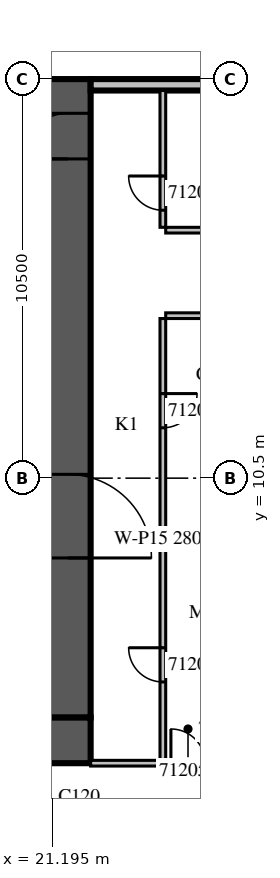
"""IFC4 building model, lengths in metres.
Left out: names, types, materials, properties, quantities, classifications, styles, units other than length and angle.
Written with IfcOpenShell. Run it as: python <this file> out.ifc"""

import sys

from ifc_helpers import new_model, si_unit, direction, frame, frame_2d, origin, place, context, subcontext, project, spatial, rectangle, extrude, source, transform, mapped, element, fill, save


model = new_model("IFC4")
c1 = context("Model", 3, precision=1e-05, world=origin(), true_north=direction((0.0, 1.0)))
c2 = subcontext(c1, "Body", "Model", "MODEL_VIEW")
j1 = project(units=[si_unit("LENGTHUNIT", "METRE"), si_unit("PLANEANGLEUNIT", "RADIAN")], contexts=[c1])
p1 = place(None, origin())
s1 = spatial("IfcSite", under=j1, at=p1, CompositionType="ELEMENT")
p2 = place(p1, origin())
s2 = spatial("IfcBuilding", under=s1, at=p2, CompositionType="ELEMENT")
p3 = place(p2, frame((0.0, 0.0, 61.5)))
s3 = spatial("IfcBuildingStorey", under=s2, at=p3, CompositionType="ELEMENT", Elevation=61.5)
m1 = source(origin(), c2, "Body", "SweptSolid", [
    extrude(rectangle(XDim=16.8, YDim=1.2, at=frame_2d((8.4, 0.0))), origin(), (0.0, 0.0, 1.0), 4.2),
])
p4 = place(p3, frame((21.6, 4.2, 0.0), z_axis=(0.0, 0.0, 1.0), x_axis=(0.0, 1.0, 0.0)))
e1 = element("IfcWall", 1, at=p4, inside=s3, PredefinedType="SHEAR", context=c2, shape_type="MappedRepresentation", body=[
    mapped(m1, transform((0.0, 0.0, 0.0), scale=1.0)),
])
m2 = source(origin(), c2, "Body", "SweptSolid", [
    extrude(rectangle(XDim=2.2, YDim=2.1, at=frame_2d((1.1, 1.05))), frame((0.0, 0.61, 0.0), z_axis=(0.0, -1.0, 0.0), x_axis=(1.0, 0.0, 0.0)), (0.0, 0.0, 1.0), 1.22),
])
p5 = place(p4, frame((4.2, 0.0, 0.0)))
e2 = element("IfcOpeningElement", 2, at=p5, cuts=e1, PredefinedType="OPENING", context=c2, shape_type="MappedRepresentation", body=[
    mapped(m2, transform((0.0, 0.0, 0.0), scale=1.0)),
])
m3 = source(origin(), c2, "Body", "SweptSolid", [
    extrude(rectangle(XDim=1.2, YDim=2.1, at=frame_2d((0.6, 1.05))), frame((0.0, 0.61, 0.0), z_axis=(0.0, -1.0, 0.0), x_axis=(1.0, 0.0, 0.0)), (0.0, 0.0, 1.0), 1.22),
])
p6 = place(p4, frame((14.7, 0.0, 0.0)))
e3 = element("IfcOpeningElement", 3, at=p6, cuts=e1, PredefinedType="OPENING", context=c2, shape_type="MappedRepresentation", body=[
    mapped(m3, transform((0.0, 0.0, 0.0), scale=1.0)),
])
m4 = source(origin(), c2, "Body", "SweptSolid", [
    extrude(rectangle(XDim=18.0, YDim=1.2, at=frame_2d((9.0, 0.0))), origin(), (0.0, 0.0, 1.0), 4.2),
])
p7 = place(p3, frame((4.2, 3.6, 0.0), z_axis=(0.0, 0.0, 1.0), x_axis=(1.0, 0.0, 0.0)))
e4 = element("IfcWall", 4, at=p7, inside=s3, PredefinedType="SHEAR", context=c2, shape_type="MappedRepresentation", body=[
    mapped(m4, transform((0.0, 0.0, 0.0), scale=1.0)),
])
m5 = source(origin(), c2, "Body", "SweptSolid", [
    extrude(rectangle(XDim=6.6, YDim=0.3, at=frame_2d((3.3, 0.0))), origin(), (0.0, 0.0, 1.0), 3.8),
])
p8 = place(p3, frame((28.8, 20.85, 0.0), z_axis=(0.0, 0.0, 1.0), x_axis=(-1.0, 0.0, 0.0)))
e5 = element("IfcWall", 5, at=p8, inside=s3, PredefinedType="STANDARD", context=c2, shape_type="MappedRepresentation", body=[
    mapped(m5, transform((0.0, 0.0, 0.0), scale=1.0)),
])
m6 = source(origin(), c2, "Body", "SweptSolid", [
    extrude(rectangle(XDim=2.4, YDim=2.7, at=frame_2d((1.2, 1.35))), frame((0.0, 0.16, 0.0), z_axis=(0.0, -1.0, 0.0), x_axis=(1.0, 0.0, 0.0)), (0.0, 0.0, 1.0), 0.32),
])
p9 = place(p8, frame((0.3, 0.0, 0.6)))
e6 = element("IfcOpeningElement", 6, at=p9, cuts=e5, PredefinedType="OPENING", context=c2, shape_type="MappedRepresentation", body=[
    mapped(m6, transform((0.0, 0.0, 0.0), scale=1.0)),
])
m7 = source(origin(), c2, "Body", "SweptSolid", [
    extrude(rectangle(XDim=11.625, YDim=0.15, at=frame_2d((5.812, 0.0))), origin(), (0.0, 0.0, 1.0), 2.8),
])
p10 = place(p3, frame((24.1, 14.7, 0.0), z_axis=(0.0, 0.0, 1.0), x_axis=(0.0, -1.0, 0.0)))
e7 = element("IfcWall", 7, at=p10, inside=s3, PredefinedType="PARTITIONING", context=c2, shape_type="MappedRepresentation", body=[
    mapped(m7, transform((0.0, 0.0, 0.0), scale=1.0)),
])
m8 = source(origin(), c2, "Body", "SweptSolid", [
    extrude(rectangle(XDim=0.9, YDim=2.1, at=frame_2d((0.45, 1.05))), frame((0.0, 0.085, 0.0), z_axis=(0.0, -1.0, 0.0), x_axis=(1.0, 0.0, 0.0)), (0.0, 0.0, 1.0), 0.17),
])
p11 = place(p10, frame((8.662, 0.0, 0.0)))
e8 = element("IfcOpeningElement", 8, at=p11, cuts=e7, PredefinedType="OPENING", context=c2, shape_type="MappedRepresentation", body=[
    mapped(m8, transform((0.0, 0.0, 0.0), scale=1.0)),
])
p12 = place(p10, frame((1.975, 0.0, 0.0)))
e9 = element("IfcOpeningElement", 9, at=p12, cuts=e7, PredefinedType="OPENING", context=c2, shape_type="MappedRepresentation", body=[
    mapped(m8, transform((0.0, 0.0, 0.0), scale=1.0)),
])
m9 = source(origin(), c2, "Body", "SweptSolid", [
    extrude(rectangle(XDim=3.6, YDim=0.15, at=frame_2d((1.8, 0.0))), origin(), (0.0, 0.0, 1.0), 3.8),
])
p13 = place(p3, frame((24.1, 20.7, 0.0), z_axis=(0.0, 0.0, 1.0), x_axis=(0.0, -1.0, 0.0)))
e10 = element("IfcWall", 10, at=p13, inside=s3, PredefinedType="PARTITIONING", context=c2, shape_type="MappedRepresentation", body=[
    mapped(m9, transform((0.0, 0.0, 0.0), scale=1.0)),
])
p14 = place(p13, frame((2.25, 0.0, 0.0)))
e11 = element("IfcOpeningElement", 11, at=p14, cuts=e10, PredefinedType="OPENING", context=c2, shape_type="MappedRepresentation", body=[
    mapped(m8, transform((0.0, 0.0, 0.0), scale=1.0)),
])
m10 = source(origin(), c2, "Body", "SweptSolid", [
    extrude(rectangle(XDim=5.15, YDim=0.15, at=frame_2d((2.575, 0.0))), origin(), (0.0, 0.0, 1.0), 3.3),
])
p15 = place(p3, frame((29.325, 8.7, 0.0), z_axis=(0.0, 0.0, 1.0), x_axis=(-1.0, 0.0, 0.0)))
e12 = element("IfcWall", 12, at=p15, inside=s3, PredefinedType="PARTITIONING", context=c2, shape_type="MappedRepresentation", body=[
    mapped(m10, transform((0.0, 0.0, 0.0), scale=1.0)),
])
m11 = source(origin(), c2, "Body", "SweptSolid", [
    extrude(rectangle(XDim=5.15, YDim=0.15, at=frame_2d((2.575, 0.0))), origin(), (0.0, 0.0, 1.0), 3.8),
])
for number, where, z_axis, x_axis in (
    (13, (29.325, 14.775, 0.0), (0.0, 0.0, 1.0), (-1.0, 0.0, 0.0)),
    (14, (24.175, 17.025, 0.0), (0.0, 0.0, 1.0), (1.0, 0.0, 0.0)),
):
    element("IfcWall", number, at=place(p3, frame(where, z_axis=z_axis, x_axis=x_axis)), inside=s3, PredefinedType="PARTITIONING", context=c2, shape_type="MappedRepresentation", body=[
        mapped(m11, transform((0.0, 0.0, 0.0), scale=1.0)),
    ])
m12 = source(origin(), c2, "Body", "SweptSolid", [
    extrude(rectangle(XDim=7.125, YDim=0.15, at=frame_2d((3.562, 0.0))), origin(), (0.0, 0.0, 1.0), 3.3),
])
p16 = place(p3, frame((22.2, 3.0, 0.0), z_axis=(0.0, 0.0, 1.0), x_axis=(1.0, 0.0, 0.0)))
e15 = element("IfcWall", 15, at=p16, inside=s3, PredefinedType="PARTITIONING", context=c2, shape_type="MappedRepresentation", body=[
    mapped(m12, transform((0.0, 0.0, 0.0), scale=1.0)),
])
m13 = source(origin(), c2, "Body", "SweptSolid", [
    extrude(rectangle(XDim=1.0, YDim=2.1, at=frame_2d((0.5, 1.05))), frame((0.0, 0.085, 0.0), z_axis=(0.0, -1.0, 0.0), x_axis=(1.0, 0.0, 0.0)), (0.0, 0.0, 1.0), 0.17),
])
p17 = place(p16, frame((3.1, 0.0, 0.0)))
e16 = element("IfcOpeningElement", 16, at=p17, cuts=e15, PredefinedType="OPENING", context=c2, shape_type="MappedRepresentation", body=[
    mapped(m13, transform((0.0, 0.0, 0.0), scale=1.0)),
])
p18 = place(p16, frame((2.112, 0.0, 0.0)))
e17 = element("IfcOpeningElement", 17, at=p18, cuts=e15, PredefinedType="OPENING", context=c2, shape_type="MappedRepresentation", body=[
    mapped(m8, transform((0.0, 0.0, 0.0), scale=1.0)),
])
m14 = source(origin(), c2, "Body", "SweptSolid", [
    extrude(rectangle(XDim=2.2, YDim=2.1, at=frame_2d((1.1, 1.05))), frame((0.0, 0.025, 0.0), z_axis=(0.0, -1.0, 0.0), x_axis=(1.0, 0.0, 0.0)), (0.0, 0.0, 1.0), 0.05),
])
p19 = place(p5, origin())
e18 = element("IfcDoor", 18, at=p19, inside=s3, OperationType="DOUBLE_DOOR_SINGLE_SWING", PredefinedType="DOOR", context=c2, shape_type="MappedRepresentation", body=[
    mapped(m14, transform((0.0, 0.0, 0.0), scale=1.0)),
])
fill(e2, e18)
m15 = source(origin(), c2, "Body", "SweptSolid", [
    extrude(rectangle(XDim=1.2, YDim=2.1, at=frame_2d((0.6, 1.05))), frame((0.0, 0.025, 0.0), z_axis=(0.0, -1.0, 0.0), x_axis=(1.0, 0.0, 0.0)), (0.0, 0.0, 1.0), 0.05),
])
p20 = place(p6, origin())
e19 = element("IfcDoor", 19, at=p20, inside=s3, OperationType="SINGLE_SWING_LEFT", PredefinedType="DOOR", context=c2, shape_type="MappedRepresentation", body=[
    mapped(m15, transform((0.0, 0.0, 0.0), scale=1.0)),
])
fill(e3, e19)
m16 = source(origin(), c2, "Body", "SweptSolid", [
    extrude(rectangle(XDim=0.9, YDim=2.1, at=frame_2d((0.45, 1.05))), frame((0.0, 0.025, 0.0), z_axis=(0.0, -1.0, 0.0), x_axis=(1.0, 0.0, 0.0)), (0.0, 0.0, 1.0), 0.05),
])
p21 = place(p11, origin())
e20 = element("IfcDoor", 20, at=p21, inside=s3, OperationType="SINGLE_SWING_RIGHT", PredefinedType="DOOR", context=c2, shape_type="MappedRepresentation", body=[
    mapped(m16, transform((0.0, 0.0, 0.0), scale=1.0)),
])
fill(e8, e20)
p22 = place(p12, origin())
e21 = element("IfcDoor", 21, at=p22, inside=s3, OperationType="SINGLE_SWING_LEFT", PredefinedType="DOOR", context=c2, shape_type="MappedRepresentation", body=[
    mapped(m16, transform((0.0, 0.0, 0.0), scale=1.0)),
])
fill(e9, e21)
p23 = place(p14, origin())
e22 = element("IfcDoor", 22, at=p23, inside=s3, OperationType="SINGLE_SWING_RIGHT", PredefinedType="DOOR", context=c2, shape_type="MappedRepresentation", body=[
    mapped(m16, transform((0.0, 0.0, 0.0), scale=1.0)),
])
fill(e11, e22)
p24 = place(p18, origin())
e23 = element("IfcDoor", 23, at=p24, inside=s3, OperationType="SINGLE_SWING_LEFT", PredefinedType="DOOR", context=c2, shape_type="MappedRepresentation", body=[
    mapped(m16, transform((0.0, 0.0, 0.0), scale=1.0)),
])
fill(e17, e23)
save(model, sys.argv[1])
